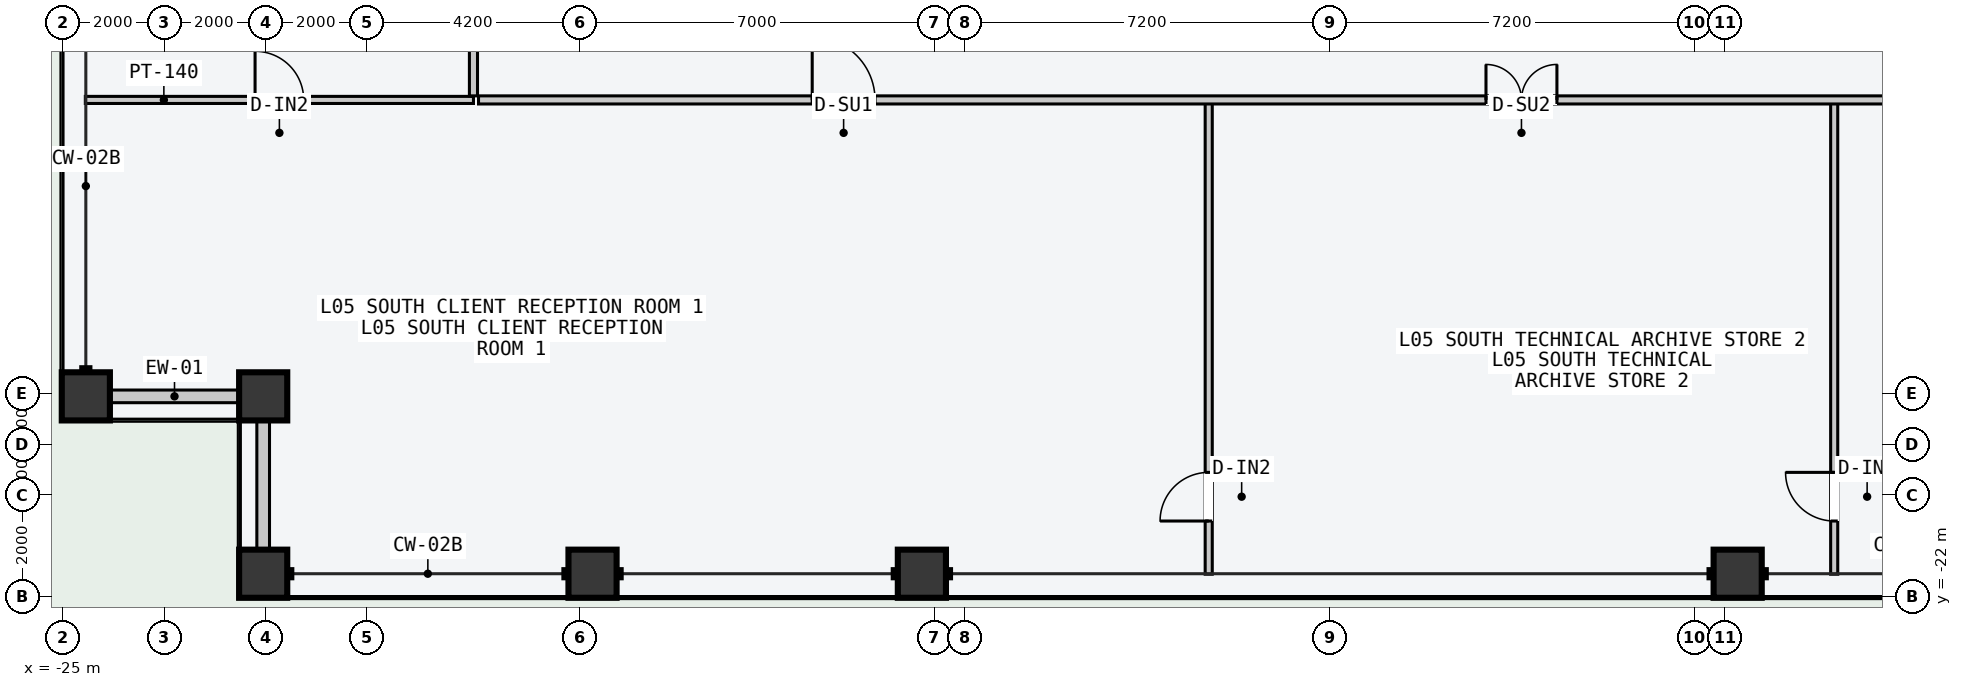
"""IFC4 building model, lengths in metres.
Left out: names, types, materials, properties, quantities, classifications, styles, units other than length and angle.
Written with IfcOpenShell. Run it as: python <this file> out.ifc"""

import sys

from ifc_helpers import new_model, si_unit, direction, frame, frame_2d, origin, origin_2d, place, context, subcontext, project, spatial, rectangle, hollow_rectangle, extrude, element, fill, save


model = new_model("IFC4")
c1 = context("Model", 3, precision=1e-05, world=origin(), true_north=direction((0.0, 1.0)))
c2 = subcontext(c1, "Body", "Model", "MODEL_VIEW")
j1 = project(units=[si_unit("LENGTHUNIT", "METRE"), si_unit("PLANEANGLEUNIT", "RADIAN")], contexts=[c1])
p1 = place(None, origin())
s1 = spatial("IfcSite", under=j1, at=p1, CompositionType="ELEMENT")
p2 = place(p1, origin())
s2 = spatial("IfcBuilding", under=s1, at=p2, CompositionType="ELEMENT")
p3 = place(p2, frame((0.0, 0.0, 24.0)))
s3 = spatial("IfcBuildingStorey", under=s2, at=p3, CompositionType="ELEMENT", Elevation=24.0)
for number, where, z_axis, x_axis in (
    (1, (-21.05, -21.55, -0.2), (0.0, 0.0, 1.0), (1.0, 0.0, 0.0)),
    (2, (-14.55, -21.55, -0.2), (0.0, 0.0, 1.0), (1.0, 0.0, 0.0)),
    (3, (-8.05, -21.55, -0.2), (0.0, 0.0, 1.0), (1.0, 0.0, 0.0)),
    (4, (8.05, -21.55, -0.2), (0.0, 0.0, 1.0), (1.0, 0.0, 0.0)),
    (5, (-24.55, -18.05, -0.2), (0.0, 0.0, 1.0), (0.0, 1.0, 0.0)),
):
    element("IfcColumn", number, at=place(p3, frame(where, z_axis=z_axis, x_axis=x_axis)), inside=s3, PredefinedType="COLUMN", context=c2, shape_type="SweptSolid", body=[
        extrude(hollow_rectangle(XDim=0.95, YDim=0.95, WallThickness=0.048, at=origin_2d()), origin(), (0.0, 0.0, 1.0), 3.8),
    ])
p4 = place(p3, frame((-21.05, -18.05, 0.0), z_axis=(0.0, 0.0, 1.0), x_axis=(1.0, 0.0, 0.0)))
e6 = element("IfcColumn", 6, at=p4, inside=s3, PredefinedType="COLUMN", context=c2, shape_type="SweptSolid", body=[
    extrude(hollow_rectangle(XDim=0.95, YDim=0.95, WallThickness=0.048, at=origin_2d()), origin(), (0.0, 0.0, 1.0), 3.6),
])
for number, where, z_axis, x_axis in (
    (7, (-24.065, -18.05, 0.0), (0.0, 0.0, 1.0), (1.0, 0.0, 0.0)),
    (8, (-21.05, -21.065, 0.0), (0.0, 0.0, 1.0), (0.0, 1.0, 0.0)),
):
    element("IfcWall", number, at=place(p3, frame(where, z_axis=z_axis, x_axis=x_axis)), inside=s3, PredefinedType="STANDARD", context=c2, shape_type="SweptSolid", body=[
        extrude(rectangle(XDim=2.53, YDim=0.25, at=frame_2d((1.265, 0.0))), origin(), (0.0, 0.0, 1.0), 2.7),
    ])
p5 = place(p3, frame((-2.389, -21.56, 0.0), z_axis=(0.0, 0.0, 1.0), x_axis=(0.0, 1.0, 0.0)))
e9 = element("IfcWall", 9, at=p5, inside=s3, PredefinedType="PARTITIONING", context=c2, shape_type="SweptSolid", body=[
    extrude(rectangle(XDim=9.3, YDim=0.14, at=frame_2d((4.65, 0.0))), origin(), (0.0, 0.0, 1.0), 3.4),
])
p6 = place(p5, frame((1.05, 0.0, 0.0)))
e10 = element("IfcOpeningElement", 10, at=p6, cuts=e9, PredefinedType="OPENING", context=c2, shape_type="SweptSolid", body=[
    extrude(rectangle(XDim=0.96, YDim=2.18, at=frame_2d((0.48, 1.09))), frame((0.0, 0.08, 0.0), z_axis=(0.0, -1.0, 0.0), x_axis=(1.0, 0.0, 0.0)), (0.0, 0.0, 1.0), 0.16),
])
p7 = place(p3, frame((9.955, -21.56, 0.0), z_axis=(0.0, 0.0, 1.0), x_axis=(0.0, 1.0, 0.0)))
e11 = element("IfcWall", 11, at=p7, inside=s3, PredefinedType="PARTITIONING", context=c2, shape_type="SweptSolid", body=[
    extrude(rectangle(XDim=9.3, YDim=0.14, at=frame_2d((4.65, 0.0))), origin(), (0.0, 0.0, 1.0), 3.4),
])
p8 = place(p7, frame((1.05, 0.0, 0.0)))
e12 = element("IfcOpeningElement", 12, at=p8, cuts=e11, PredefinedType="OPENING", context=c2, shape_type="SweptSolid", body=[
    extrude(rectangle(XDim=0.96, YDim=2.18, at=frame_2d((0.48, 1.09))), frame((0.0, 0.08, 0.0), z_axis=(0.0, -1.0, 0.0), x_axis=(1.0, 0.0, 0.0)), (0.0, 0.0, 1.0), 0.16),
])
p9 = place(p3, frame((-16.8, -12.2, 0.0), z_axis=(0.0, 0.0, 1.0), x_axis=(1.0, 0.0, 0.0)))
e13 = element("IfcWall", 13, at=p9, inside=s3, PredefinedType="PARTITIONING", context=c2, shape_type="SweptSolid", body=[
    extrude(rectangle(XDim=33.6, YDim=0.16, at=frame_2d((16.8, 0.0))), origin(), (0.0, 0.0, 1.0), 3.4),
])
p10 = place(p9, frame((6.585, 0.0, 0.0)))
e14 = element("IfcOpeningElement", 14, at=p10, cuts=e13, PredefinedType="OPENING", context=c2, shape_type="SweptSolid", body=[
    extrude(rectangle(XDim=1.24, YDim=2.24, at=frame_2d((0.62, 1.12))), frame((0.0, 0.09, 0.0), z_axis=(0.0, -1.0, 0.0), x_axis=(1.0, 0.0, 0.0)), (0.0, 0.0, 1.0), 0.18),
])
p11 = place(p9, frame((19.883, 0.0, 0.0)))
e15 = element("IfcOpeningElement", 15, at=p11, cuts=e13, PredefinedType="OPENING", context=c2, shape_type="SweptSolid", body=[
    extrude(rectangle(XDim=1.4, YDim=2.2, at=frame_2d((0.7, 1.1))), frame((0.0, 0.09, 0.0), z_axis=(0.0, -1.0, 0.0), x_axis=(1.0, 0.0, 0.0)), (0.0, 0.0, 1.0), 0.18),
])
p12 = place(p9, frame((29.728, 0.0, 0.0)))
e16 = element("IfcOpeningElement", 16, at=p12, cuts=e13, PredefinedType="OPENING", context=c2, shape_type="SweptSolid", body=[
    extrude(rectangle(XDim=0.9, YDim=2.15, at=frame_2d((0.45, 1.075))), frame((0.0, 0.09, 0.0), z_axis=(0.0, -1.0, 0.0), x_axis=(1.0, 0.0, 0.0)), (0.0, 0.0, 1.0), 0.18),
])
p13 = place(p3, frame((-24.56, -12.2, 0.0), z_axis=(0.0, 0.0, 1.0), x_axis=(1.0, 0.0, 0.0)))
e17 = element("IfcWall", 17, at=p13, inside=s3, PredefinedType="PARTITIONING", context=c2, shape_type="SweptSolid", body=[
    extrude(rectangle(XDim=7.66, YDim=0.14, at=frame_2d((3.83, 0.0))), origin(), (0.0, 0.0, 1.0), 3.4),
])
p14 = place(p13, frame((3.35, 0.0, 0.0)))
e18 = element("IfcOpeningElement", 18, at=p14, cuts=e17, PredefinedType="OPENING", context=c2, shape_type="SweptSolid", body=[
    extrude(rectangle(XDim=0.96, YDim=2.18, at=frame_2d((0.48, 1.09))), frame((0.0, 0.08, 0.0), z_axis=(0.0, -1.0, 0.0), x_axis=(1.0, 0.0, 0.0)), (0.0, 0.0, 1.0), 0.16),
])
p15 = place(p3, frame((-16.9, -12.12, 0.0), z_axis=(0.0, 0.0, 1.0), x_axis=(0.0, 1.0, 0.0)))
e19 = element("IfcWall", 19, at=p15, inside=s3, PredefinedType="PARTITIONING", context=c2, shape_type="SweptSolid", body=[
    extrude(rectangle(XDim=24.24, YDim=0.16, at=frame_2d((12.12, 0.0))), origin(), (0.0, 0.0, 1.0), 3.4),
])
p16 = place(p15, frame((11.61, 0.0, 0.0)))
e20 = element("IfcOpeningElement", 20, at=p16, cuts=e19, PredefinedType="OPENING", context=c2, shape_type="SweptSolid", body=[
    extrude(rectangle(XDim=1.02, YDim=2.2, at=frame_2d((0.51, 1.1))), frame((0.0, 0.09, 0.0), z_axis=(0.0, -1.0, 0.0), x_axis=(1.0, 0.0, 0.0)), (0.0, 0.0, 1.0), 0.18),
])
p17 = place(p6, origin())
e21 = element("IfcDoor", 21, at=p17, inside=s3, OperationType="SINGLE_SWING_LEFT", PredefinedType="DOOR", context=c2, shape_type="SweptSolid", body=[
    extrude(rectangle(XDim=0.96, YDim=2.18, at=frame_2d((0.48, 1.09))), frame((0.0, 0.025, 0.0), z_axis=(0.0, -1.0, 0.0), x_axis=(1.0, 0.0, 0.0)), (0.0, 0.0, 1.0), 0.05),
])
fill(e10, e21)
p18 = place(p8, origin())
e22 = element("IfcDoor", 22, at=p18, inside=s3, OperationType="SINGLE_SWING_RIGHT", PredefinedType="DOOR", context=c2, shape_type="SweptSolid", body=[
    extrude(rectangle(XDim=0.96, YDim=2.18, at=frame_2d((0.48, 1.09))), frame((0.0, 0.025, 0.0), z_axis=(0.0, -1.0, 0.0), x_axis=(1.0, 0.0, 0.0)), (0.0, 0.0, 1.0), 0.05),
])
fill(e12, e22)
p19 = place(p10, origin())
e23 = element("IfcDoor", 23, at=p19, inside=s3, OperationType="SINGLE_SWING_LEFT", PredefinedType="DOOR", context=c2, shape_type="SweptSolid", body=[
    extrude(rectangle(XDim=1.24, YDim=2.24, at=frame_2d((0.62, 1.12))), frame((0.0, 0.025, 0.0), z_axis=(0.0, -1.0, 0.0), x_axis=(1.0, 0.0, 0.0)), (0.0, 0.0, 1.0), 0.05),
])
fill(e14, e23)
p20 = place(p11, origin())
e24 = element("IfcDoor", 24, at=p20, inside=s3, OperationType="DOUBLE_DOOR_SINGLE_SWING", PredefinedType="DOOR", context=c2, shape_type="SweptSolid", body=[
    extrude(rectangle(XDim=1.4, YDim=2.2, at=frame_2d((0.7, 1.1))), frame((0.0, 0.025, 0.0), z_axis=(0.0, -1.0, 0.0), x_axis=(1.0, 0.0, 0.0)), (0.0, 0.0, 1.0), 0.05),
])
fill(e15, e24)
p21 = place(p14, origin())
e25 = element("IfcDoor", 25, at=p21, inside=s3, OperationType="SINGLE_SWING_LEFT", PredefinedType="DOOR", context=c2, shape_type="SweptSolid", body=[
    extrude(rectangle(XDim=0.96, YDim=2.18, at=frame_2d((0.48, 1.09))), frame((0.0, 0.025, 0.0), z_axis=(0.0, -1.0, 0.0), x_axis=(1.0, 0.0, 0.0)), (0.0, 0.0, 1.0), 0.05),
])
fill(e18, e25)
save(model, sys.argv[1])
